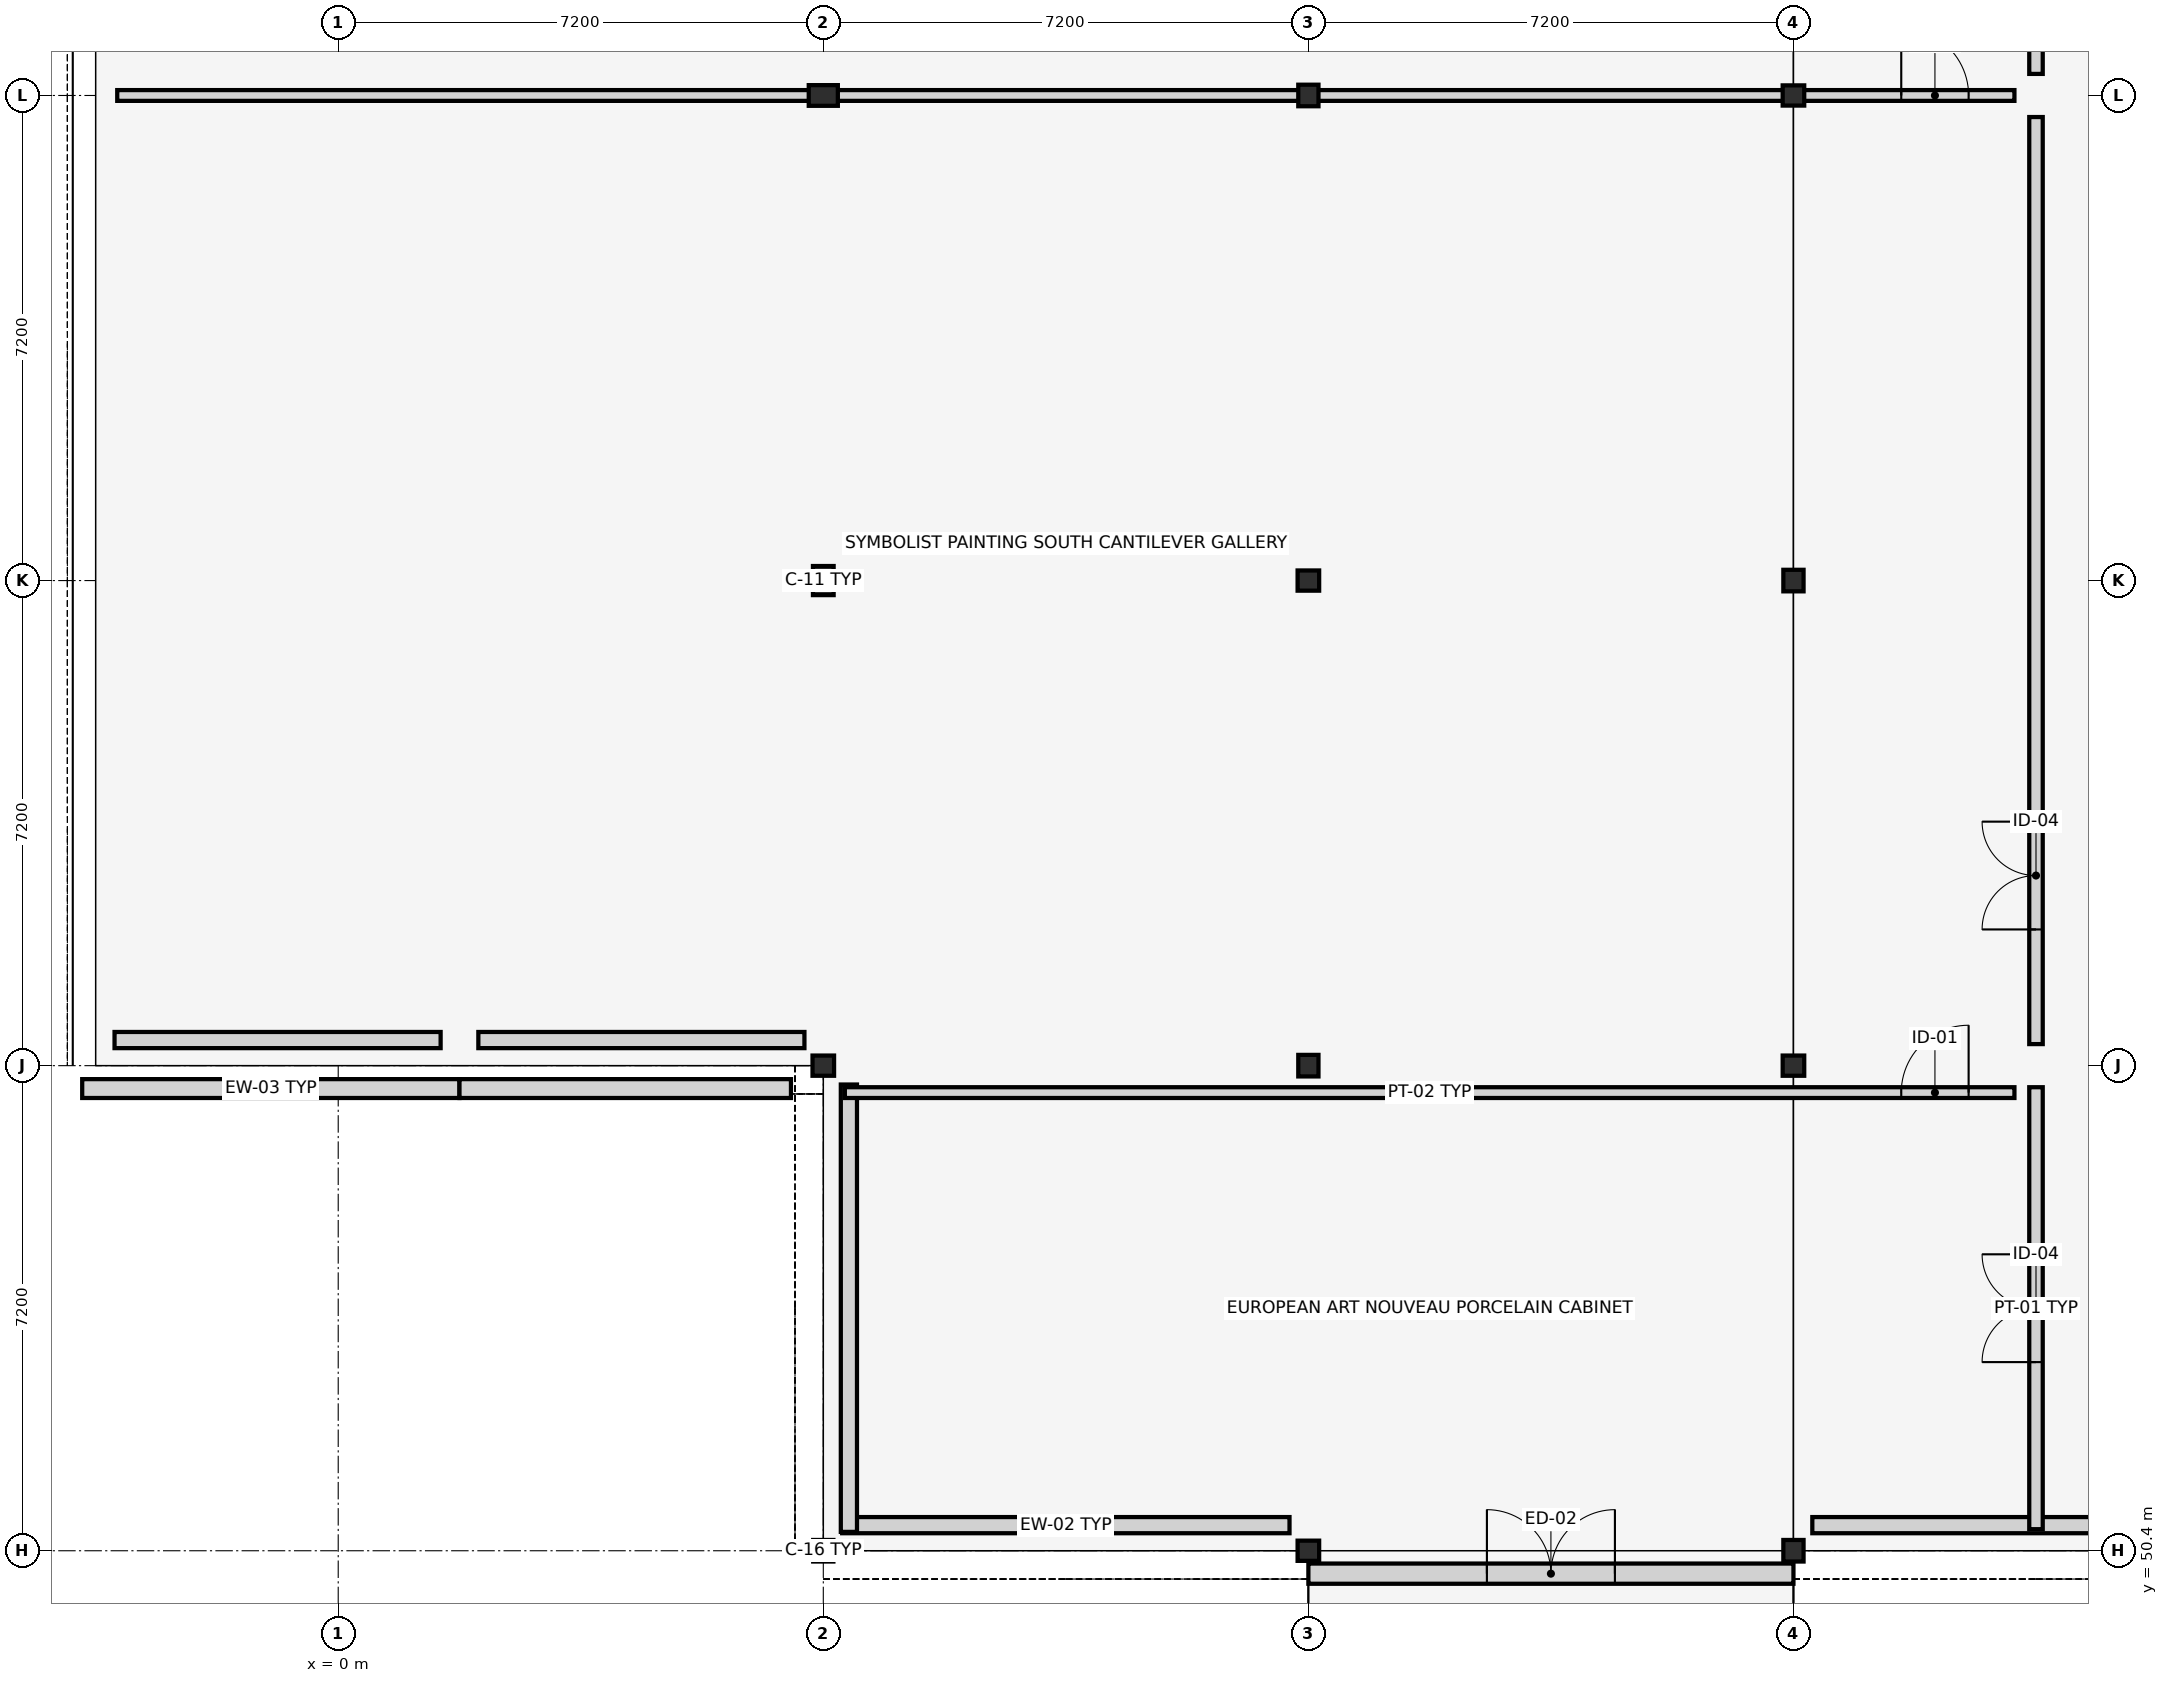
"""IFC4 building model, lengths in metres.
Left out: names, types, materials, properties, quantities, classifications, styles, units other than length and angle.
Written with IfcOpenShell. Run it as: python <this file> out.ifc"""

import sys

from ifc_helpers import new_model, si_unit, direction, frame, frame_2d, origin, origin_2d, place, context, subcontext, project, spatial, rectangle, i_section, extrude, element, fill, save


model = new_model("IFC4")
c1 = context("Model", 3, precision=1e-05, world=origin(), true_north=direction((0.0, 1.0)))
c2 = subcontext(c1, "Body", "Model", "MODEL_VIEW")
j1 = project(units=[si_unit("LENGTHUNIT", "METRE"), si_unit("PLANEANGLEUNIT", "RADIAN")], contexts=[c1])
p1 = place(None, origin())
s1 = spatial("IfcSite", under=j1, at=p1, CompositionType="ELEMENT")
p2 = place(p1, origin())
s2 = spatial("IfcBuilding", under=s1, at=p2, CompositionType="ELEMENT")
p3 = place(p2, frame((0.0, 0.0, 8.7)))
s3 = spatial("IfcBuildingStorey", under=s2, at=p3, CompositionType="ELEMENT", Elevation=8.7)
for number, where, z_axis, x_axis in (
    (1, (7.2, 50.4, 0.0), (0.0, 0.0, 1.0), (1.0, 0.0, 0.0)),
    (2, (7.2, 57.6, 0.0), (0.0, 0.0, 1.0), (0.0, 1.0, 0.0)),
):
    element("IfcColumn", number, at=place(p3, frame(where, z_axis=z_axis, x_axis=x_axis)), inside=s3, PredefinedType="COLUMN", context=c2, shape_type="SweptSolid", body=[
        extrude(i_section(OverallWidth=0.3, OverallDepth=0.32, WebThickness=0.011, FlangeThickness=0.021, FilletRadius=0.027, at=origin_2d()), origin(), (0.0, 0.0, 1.0), 4.2),
    ])
for number, where, z_axis, x_axis in (
    (3, (7.2, 64.8, 0.0), (0.0, 0.0, 1.0), (1.0, 0.0, 0.0)),
    (4, (7.2, 72.0, 0.0), (0.0, 0.0, 1.0), (0.0, 1.0, 0.0)),
):
    element("IfcColumn", number, at=place(p3, frame(where, z_axis=z_axis, x_axis=x_axis)), inside=s3, PredefinedType="COLUMN", context=c2, shape_type="SweptSolid", body=[
        extrude(i_section(OverallWidth=0.307, OverallDepth=0.432, WebThickness=0.021, FlangeThickness=0.04, FilletRadius=0.027, at=origin_2d()), origin(), (0.0, 0.0, 1.0), 4.2),
    ])
for number, where, z_axis, x_axis in (
    (5, (14.4, 50.4, 0.0), (0.0, 0.0, 1.0), (0.0, 1.0, 0.0)),
    (6, (14.4, 57.6, 0.0), (0.0, 0.0, 1.0), (1.0, 0.0, 0.0)),
    (7, (14.4, 64.8, 0.0), (0.0, 0.0, 1.0), (0.0, 1.0, 0.0)),
    (8, (14.4, 72.0, 0.0), (0.0, 0.0, 1.0), (1.0, 0.0, 0.0)),
    (9, (21.6, 50.4, 0.0), (0.0, 0.0, 1.0), (1.0, 0.0, 0.0)),
    (10, (21.6, 57.6, 0.0), (0.0, 0.0, 1.0), (0.0, 1.0, 0.0)),
    (11, (21.6, 64.8, 0.0), (0.0, 0.0, 1.0), (1.0, 0.0, 0.0)),
    (12, (21.6, 72.0, 0.0), (0.0, 0.0, 1.0), (0.0, 1.0, 0.0)),
):
    element("IfcColumn", number, at=place(p3, frame(where, z_axis=z_axis, x_axis=x_axis)), inside=s3, PredefinedType="COLUMN", context=c2, shape_type="SweptSolid", body=[
        extrude(i_section(OverallWidth=0.3, OverallDepth=0.32, WebThickness=0.011, FlangeThickness=0.021, FilletRadius=0.027, at=origin_2d()), origin(), (0.0, 0.0, 1.0), 4.2),
    ])
p4 = place(p3, frame((7.48, 50.78, 0.0), z_axis=(0.0, 0.0, 1.0), x_axis=(1.0, 0.0, 0.0)))
e13 = element("IfcWall", 13, at=p4, inside=s3, PredefinedType="STANDARD", context=c2, shape_type="SweptSolid", body=[
    extrude(rectangle(XDim=6.64, YDim=0.24, at=frame_2d((3.32, 0.0))), origin(), (0.0, 0.0, 1.0), 3.56),
])
p5 = place(p3, frame((14.4, 50.06, 0.0), z_axis=(0.0, 0.0, 1.0), x_axis=(1.0, 0.0, 0.0)))
e14 = element("IfcWall", 14, at=p5, inside=s3, PredefinedType="STANDARD", context=c2, shape_type="SweptSolid", body=[
    extrude(rectangle(XDim=7.2, YDim=0.3, at=frame_2d((3.6, 0.0))), origin(), (0.0, 0.0, 1.0), 3.65),
])
p6 = place(p5, frame((2.65, 0.0, 0.0)))
e15 = element("IfcOpeningElement", 15, at=p6, cuts=e14, PredefinedType="OPENING", context=c2, shape_type="SweptSolid", body=[
    extrude(rectangle(XDim=1.9, YDim=2.45, at=frame_2d((0.95, 1.225))), frame((0.0, 0.16, 0.0), z_axis=(0.0, -1.0, 0.0), x_axis=(1.0, 0.0, 0.0)), (0.0, 0.0, 1.0), 0.32),
])
p7 = place(p3, frame((21.88, 50.78, 0.0), z_axis=(0.0, 0.0, 1.0), x_axis=(1.0, 0.0, 0.0)))
e16 = element("IfcWall", 16, at=p7, inside=s3, PredefinedType="STANDARD", context=c2, shape_type="SweptSolid", body=[
    extrude(rectangle(XDim=6.64, YDim=0.24, at=frame_2d((3.32, 0.0))), origin(), (0.0, 0.0, 1.0), 3.56),
])
p8 = place(p3, frame((-3.8, 57.26, 0.0), z_axis=(0.0, 0.0, 1.0), x_axis=(1.0, 0.0, 0.0)))
e17 = element("IfcWall", 17, at=p8, inside=s3, PredefinedType="STANDARD", context=c2, shape_type="SweptSolid", body=[
    extrude(rectangle(XDim=5.6, YDim=0.28, at=frame_2d((2.8, 0.0))), origin(), (0.0, 0.0, 1.0), 4.2),
])
p9 = place(p3, frame((-3.32, 57.98, 0.0), z_axis=(0.0, 0.0, 1.0), x_axis=(1.0, 0.0, 0.0)))
e18 = element("IfcWall", 18, at=p9, inside=s3, PredefinedType="STANDARD", context=c2, shape_type="SweptSolid", body=[
    extrude(rectangle(XDim=4.84, YDim=0.24, at=frame_2d((2.42, 0.0))), origin(), (0.0, 0.0, 1.0), 3.56),
])
p10 = place(p3, frame((1.8, 57.26, 0.0), z_axis=(0.0, 0.0, 1.0), x_axis=(1.0, 0.0, 0.0)))
e19 = element("IfcWall", 19, at=p10, inside=s3, PredefinedType="STANDARD", context=c2, shape_type="SweptSolid", body=[
    extrude(rectangle(XDim=4.92, YDim=0.28, at=frame_2d((2.46, 0.0))), origin(), (0.0, 0.0, 1.0), 4.2),
])
p11 = place(p3, frame((2.08, 57.98, 0.0), z_axis=(0.0, 0.0, 1.0), x_axis=(1.0, 0.0, 0.0)))
e20 = element("IfcWall", 20, at=p11, inside=s3, PredefinedType="STANDARD", context=c2, shape_type="SweptSolid", body=[
    extrude(rectangle(XDim=4.84, YDim=0.24, at=frame_2d((2.42, 0.0))), origin(), (0.0, 0.0, 1.0), 3.56),
])
p12 = place(p3, frame((7.58, 57.32, 0.0), z_axis=(0.0, 0.0, 1.0), x_axis=(0.0, -1.0, 0.0)))
e21 = element("IfcWall", 21, at=p12, inside=s3, PredefinedType="STANDARD", context=c2, shape_type="SweptSolid", body=[
    extrude(rectangle(XDim=6.64, YDim=0.24, at=frame_2d((3.32, 0.0))), origin(), (0.0, 0.0, 1.0), 3.56),
])
p13 = place(p3, frame((25.2, 50.72, 0.0), z_axis=(0.0, 0.0, 1.0), x_axis=(0.0, 1.0, 0.0)))
e22 = element("IfcWall", 22, at=p13, inside=s3, PredefinedType="PARTITIONING", context=c2, shape_type="SweptSolid", body=[
    extrude(rectangle(XDim=6.56, YDim=0.2, at=frame_2d((3.28, 0.0))), origin(), (0.0, 0.0, 1.0), 3.15),
])
p14 = place(p13, frame((2.48, 0.0, 0.0)))
e23 = element("IfcOpeningElement", 23, at=p14, cuts=e22, PredefinedType="OPENING", context=c2, shape_type="SweptSolid", body=[
    extrude(rectangle(XDim=1.6, YDim=2.35, at=frame_2d((0.8, 1.175))), frame((0.0, 0.11, 0.0), z_axis=(0.0, -1.0, 0.0), x_axis=(1.0, 0.0, 0.0)), (0.0, 0.0, 1.0), 0.22),
])
p15 = place(p3, frame((25.2, 57.92, 0.0), z_axis=(0.0, 0.0, 1.0), x_axis=(0.0, 1.0, 0.0)))
e24 = element("IfcWall", 24, at=p15, inside=s3, PredefinedType="PARTITIONING", context=c2, shape_type="SweptSolid", body=[
    extrude(rectangle(XDim=13.76, YDim=0.2, at=frame_2d((6.88, 0.0))), origin(), (0.0, 0.0, 1.0), 3.15),
])
p16 = place(p15, frame((1.702, 0.0, 0.0)))
e25 = element("IfcOpeningElement", 25, at=p16, cuts=e24, PredefinedType="OPENING", context=c2, shape_type="SweptSolid", body=[
    extrude(rectangle(XDim=1.6, YDim=2.35, at=frame_2d((0.8, 1.175))), frame((0.0, 0.11, 0.0), z_axis=(0.0, -1.0, 0.0), x_axis=(1.0, 0.0, 0.0)), (0.0, 0.0, 1.0), 0.22),
])
p17 = place(p3, frame((25.2, 72.32, 0.0), z_axis=(0.0, 0.0, 1.0), x_axis=(0.0, 1.0, 0.0)))
e26 = element("IfcWall", 26, at=p17, inside=s3, PredefinedType="PARTITIONING", context=c2, shape_type="SweptSolid", body=[
    extrude(rectangle(XDim=20.96, YDim=0.2, at=frame_2d((10.48, 0.0))), origin(), (0.0, 0.0, 1.0), 3.15),
])
p18 = place(p17, frame((9.73, 0.0, 0.0)))
e27 = element("IfcOpeningElement", 27, at=p18, cuts=e26, PredefinedType="OPENING", context=c2, shape_type="SweptSolid", body=[
    extrude(rectangle(XDim=1.5, YDim=2.25, at=frame_2d((0.75, 1.125))), frame((0.0, 0.11, 0.0), z_axis=(0.0, -1.0, 0.0), x_axis=(1.0, 0.0, 0.0)), (0.0, 0.0, 1.0), 0.22),
])
p19 = place(p3, frame((7.52, 57.2, 0.0), z_axis=(0.0, 0.0, 1.0), x_axis=(1.0, 0.0, 0.0)))
e28 = element("IfcWall", 28, at=p19, inside=s3, PredefinedType="PARTITIONING", context=c2, shape_type="SweptSolid", body=[
    extrude(rectangle(XDim=17.36, YDim=0.16, at=frame_2d((8.68, 0.0))), origin(), (0.0, 0.0, 1.0), 3.15),
])
p20 = place(p19, frame((15.68, 0.0, 0.0)))
e29 = element("IfcOpeningElement", 29, at=p20, cuts=e28, PredefinedType="OPENING", context=c2, shape_type="SweptSolid", body=[
    extrude(rectangle(XDim=1.0, YDim=2.15, at=frame_2d((0.5, 1.075))), frame((0.0, 0.09, 0.0), z_axis=(0.0, -1.0, 0.0), x_axis=(1.0, 0.0, 0.0)), (0.0, 0.0, 1.0), 0.18),
])
p21 = place(p3, frame((-3.28, 72.0, 0.0), z_axis=(0.0, 0.0, 1.0), x_axis=(1.0, 0.0, 0.0)))
e30 = element("IfcWall", 30, at=p21, inside=s3, PredefinedType="PARTITIONING", context=c2, shape_type="SweptSolid", body=[
    extrude(rectangle(XDim=28.16, YDim=0.16, at=frame_2d((14.08, 0.0))), origin(), (0.0, 0.0, 1.0), 3.15),
])
p22 = place(p21, frame((26.48, 0.0, 0.0)))
e31 = element("IfcOpeningElement", 31, at=p22, cuts=e30, PredefinedType="OPENING", context=c2, shape_type="SweptSolid", body=[
    extrude(rectangle(XDim=1.0, YDim=2.15, at=frame_2d((0.5, 1.075))), frame((0.0, 0.09, 0.0), z_axis=(0.0, -1.0, 0.0), x_axis=(1.0, 0.0, 0.0)), (0.0, 0.0, 1.0), 0.18),
])
p23 = place(p6, origin())
e32 = element("IfcDoor", 32, at=p23, inside=s3, OperationType="DOUBLE_DOOR_SINGLE_SWING", PredefinedType="DOOR", context=c2, shape_type="SweptSolid", body=[
    extrude(rectangle(XDim=1.9, YDim=2.45, at=frame_2d((0.95, 1.225))), frame((0.0, 0.025, 0.0), z_axis=(0.0, -1.0, 0.0), x_axis=(1.0, 0.0, 0.0)), (0.0, 0.0, 1.0), 0.05),
])
fill(e15, e32)
p24 = place(p14, origin())
e33 = element("IfcDoor", 33, at=p24, inside=s3, OperationType="DOUBLE_DOOR_SINGLE_SWING", PredefinedType="DOOR", context=c2, shape_type="SweptSolid", body=[
    extrude(rectangle(XDim=1.6, YDim=2.35, at=frame_2d((0.8, 1.175))), frame((0.0, 0.025, 0.0), z_axis=(0.0, -1.0, 0.0), x_axis=(1.0, 0.0, 0.0)), (0.0, 0.0, 1.0), 0.05),
])
fill(e23, e33)
p25 = place(p16, origin())
e34 = element("IfcDoor", 34, at=p25, inside=s3, OperationType="DOUBLE_DOOR_SINGLE_SWING", PredefinedType="DOOR", context=c2, shape_type="SweptSolid", body=[
    extrude(rectangle(XDim=1.6, YDim=2.35, at=frame_2d((0.8, 1.175))), frame((0.0, 0.025, 0.0), z_axis=(0.0, -1.0, 0.0), x_axis=(1.0, 0.0, 0.0)), (0.0, 0.0, 1.0), 0.05),
])
fill(e25, e34)
p26 = place(p20, origin())
e35 = element("IfcDoor", 35, at=p26, inside=s3, OperationType="SINGLE_SWING_RIGHT", PredefinedType="DOOR", context=c2, shape_type="SweptSolid", body=[
    extrude(rectangle(XDim=1.0, YDim=2.15, at=frame_2d((0.5, 1.075))), frame((0.0, 0.025, 0.0), z_axis=(0.0, -1.0, 0.0), x_axis=(1.0, 0.0, 0.0)), (0.0, 0.0, 1.0), 0.05),
])
fill(e29, e35)
p27 = place(p22, origin())
e36 = element("IfcDoor", 36, at=p27, inside=s3, OperationType="SINGLE_SWING_LEFT", PredefinedType="DOOR", context=c2, shape_type="SweptSolid", body=[
    extrude(rectangle(XDim=1.0, YDim=2.15, at=frame_2d((0.5, 1.075))), frame((0.0, 0.025, 0.0), z_axis=(0.0, -1.0, 0.0), x_axis=(1.0, 0.0, 0.0)), (0.0, 0.0, 1.0), 0.05),
])
fill(e31, e36)
save(model, sys.argv[1])
